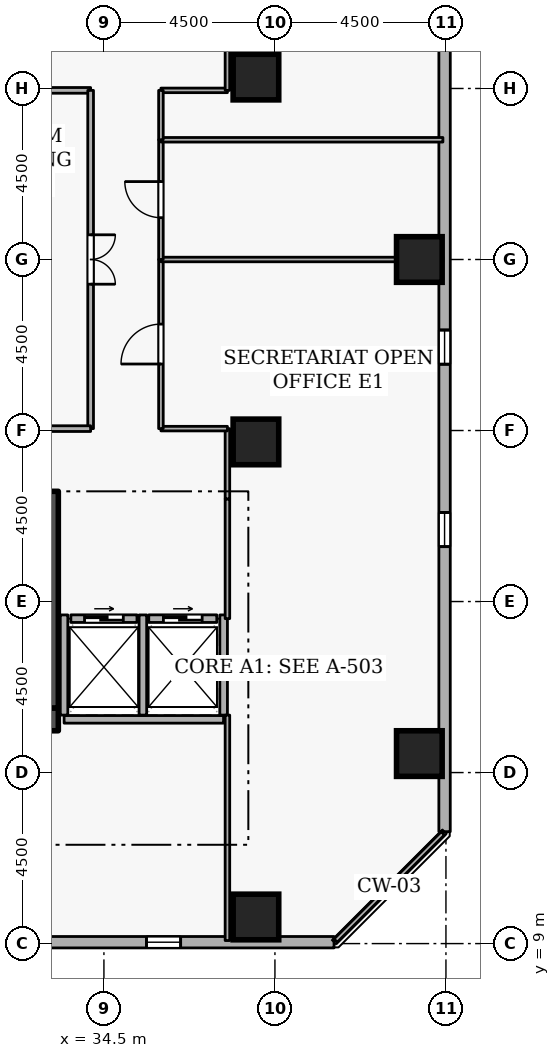
"""IFC4 building model, lengths in metres.
Left out: names, types, materials, properties, quantities, classifications, styles, units other than length and angle.
Written with IfcOpenShell. Run it as: python <this file> out.ifc"""

import sys

from ifc_helpers import new_model, si_unit, direction, frame, frame_2d, origin, origin_2d, place, context, subcontext, project, spatial, rectangle, extrude, element, fill, save


model = new_model("IFC4")
c1 = context("Model", 3, precision=1e-05, world=origin(), true_north=direction((0.0, 1.0)))
c2 = subcontext(c1, "Body", "Model", "MODEL_VIEW")
j1 = project(units=[si_unit("LENGTHUNIT", "METRE"), si_unit("PLANEANGLEUNIT", "RADIAN")], contexts=[c1])
p1 = place(None, origin())
s1 = spatial("IfcSite", under=j1, at=p1, CompositionType="ELEMENT")
p2 = place(p1, origin())
s2 = spatial("IfcBuilding", under=s1, at=p2, CompositionType="ELEMENT")
p3 = place(p2, frame((0.0, 0.0, 112.5)))
s3 = spatial("IfcBuildingStorey", under=s2, at=p3, CompositionType="ELEMENT", Elevation=112.5)
p4 = place(p3, frame((17.7, 14.9, 0.0), z_axis=(0.0, 0.0, 1.0), x_axis=(1.0, 0.0, 0.0)))
e1 = element("IfcWall", 1, at=p4, inside=s3, PredefinedType="SHEAR", context=c2, shape_type="SweptSolid", body=[
    extrude(rectangle(XDim=15.6, YDim=0.6, at=frame_2d((7.8, 0.0))), origin(), (0.0, 0.0, 1.0), 3.6),
])
p5 = place(p3, frame((33.0, 15.2, 0.0), z_axis=(0.0, 0.0, 1.0), x_axis=(0.0, 1.0, 0.0)))
e2 = element("IfcWall", 2, at=p5, inside=s3, PredefinedType="SHEAR", context=c2, shape_type="SweptSolid", body=[
    extrude(rectangle(XDim=5.7, YDim=0.6, at=frame_2d((2.85, 0.0))), origin(), (0.0, 0.0, 1.0), 3.6),
])
for number, where, z_axis, x_axis in (
    (3, (38.5, 9.7, 0.0), (0.0, 0.0, 1.0), (1.0, 0.0, 0.0)),
    (4, (42.8, 14.0, 0.0), (0.0, 0.0, 1.0), (1.0, 0.0, 0.0)),
    (5, (42.8, 27.0, 0.0), (0.0, 0.0, 1.0), (1.0, 0.0, 0.0)),
    (6, (38.5, 22.2, 0.0), (0.0, 0.0, 1.0), (1.0, 0.0, 0.0)),
    (7, (38.5, 31.8, 0.0), (0.0, 0.0, 1.0), (1.0, 0.0, 0.0)),
):
    element("IfcColumn", number, at=place(p3, frame(where, z_axis=z_axis, x_axis=x_axis)), inside=s3, PredefinedType="COLUMN", context=c2, shape_type="SweptSolid", body=[
        extrude(rectangle(XDim=1.2, YDim=1.2, at=origin_2d()), origin(), (0.0, 0.0, 1.0), 3.6),
    ])
p6 = place(p3, frame((4.119, 9.035, 0.0), z_axis=(0.0, 0.0, 1.0), x_axis=(0.999999999641, 2.6801568e-05, 0.0)))
e8 = element("IfcWall", 8, at=p6, inside=s3, PredefinedType="STANDARD", context=c2, shape_type="SweptSolid", body=[
    extrude(rectangle(XDim=36.437, YDim=0.3, at=frame_2d((18.218, 0.0))), origin(), (0.0, 0.0, 1.0), 2.7),
])
p7 = place(p6, frame((2.7, 0.0, 0.72)))
e9 = element("IfcOpeningElement", 9, at=p7, cuts=e8, PredefinedType="OPENING", context=c2, shape_type="SweptSolid", body=[
    extrude(rectangle(XDim=0.9, YDim=1.75, at=frame_2d((0.45, 0.875))), frame((0.0, 0.16, 0.0), z_axis=(0.0, -1.0, 0.0), x_axis=(1.0, 0.0, 0.0)), (0.0, 0.0, 1.0), 0.32),
])
p8 = place(p6, frame((12.3, 0.0, 0.72)))
e10 = element("IfcOpeningElement", 10, at=p8, cuts=e8, PredefinedType="OPENING", context=c2, shape_type="SweptSolid", body=[
    extrude(rectangle(XDim=0.9, YDim=1.75, at=frame_2d((0.45, 0.875))), frame((0.0, 0.16, 0.0), z_axis=(0.0, -1.0, 0.0), x_axis=(1.0, 0.0, 0.0)), (0.0, 0.0, 1.0), 0.32),
])
p9 = place(p6, frame((17.1, 0.0, 0.72)))
e11 = element("IfcOpeningElement", 11, at=p9, cuts=e8, PredefinedType="OPENING", context=c2, shape_type="SweptSolid", body=[
    extrude(rectangle(XDim=0.9, YDim=1.75, at=frame_2d((0.45, 0.875))), frame((0.0, 0.16, 0.0), z_axis=(0.0, -1.0, 0.0), x_axis=(1.0, 0.0, 0.0)), (0.0, 0.0, 1.0), 0.32),
])
p10 = place(p6, frame((26.7, 0.0, 0.72)))
e12 = element("IfcOpeningElement", 12, at=p10, cuts=e8, PredefinedType="OPENING", context=c2, shape_type="SweptSolid", body=[
    extrude(rectangle(XDim=0.9, YDim=1.75, at=frame_2d((0.45, 0.875))), frame((0.0, 0.16, 0.0), z_axis=(0.0, -1.0, 0.0), x_axis=(1.0, 0.0, 0.0)), (0.0, 0.0, 1.0), 0.32),
])
p11 = place(p6, frame((31.5, 0.0, 0.72)))
e13 = element("IfcOpeningElement", 13, at=p11, cuts=e8, PredefinedType="OPENING", context=c2, shape_type="SweptSolid", body=[
    extrude(rectangle(XDim=0.9, YDim=1.75, at=frame_2d((0.45, 0.875))), frame((0.0, 0.16, 0.0), z_axis=(0.0, -1.0, 0.0), x_axis=(1.0, 0.0, 0.0)), (0.0, 0.0, 1.0), 0.32),
])
p12 = place(p3, frame((43.464, 11.945, 0.0), z_axis=(0.0, 0.0, 1.0), x_axis=(2.6801568e-05, 0.999999999641, 0.0)))
e14 = element("IfcWall", 14, at=p12, inside=s3, PredefinedType="STANDARD", context=c2, shape_type="SweptSolid", body=[
    extrude(rectangle(XDim=36.437, YDim=0.3, at=frame_2d((18.218, 0.0))), origin(), (0.0, 0.0, 1.0), 2.7),
])
p13 = place(p12, frame((7.5, 0.0, 0.72)))
e15 = element("IfcOpeningElement", 15, at=p13, cuts=e14, PredefinedType="OPENING", context=c2, shape_type="SweptSolid", body=[
    extrude(rectangle(XDim=0.9, YDim=1.75, at=frame_2d((0.45, 0.875))), frame((0.0, 0.16, 0.0), z_axis=(0.0, -1.0, 0.0), x_axis=(1.0, 0.0, 0.0)), (0.0, 0.0, 1.0), 0.32),
])
p14 = place(p12, frame((12.3, 0.0, 0.72)))
e16 = element("IfcOpeningElement", 16, at=p14, cuts=e14, PredefinedType="OPENING", context=c2, shape_type="SweptSolid", body=[
    extrude(rectangle(XDim=0.9, YDim=1.75, at=frame_2d((0.45, 0.875))), frame((0.0, 0.16, 0.0), z_axis=(0.0, -1.0, 0.0), x_axis=(1.0, 0.0, 0.0)), (0.0, 0.0, 1.0), 0.32),
])
p15 = place(p12, frame((21.9, 0.0, 0.72)))
e17 = element("IfcOpeningElement", 17, at=p15, cuts=e14, PredefinedType="OPENING", context=c2, shape_type="SweptSolid", body=[
    extrude(rectangle(XDim=0.9, YDim=1.75, at=frame_2d((0.45, 0.875))), frame((0.0, 0.16, 0.0), z_axis=(0.0, -1.0, 0.0), x_axis=(1.0, 0.0, 0.0)), (0.0, 0.0, 1.0), 0.32),
])
p16 = place(p12, frame((31.5, 0.0, 0.72)))
e18 = element("IfcOpeningElement", 18, at=p16, cuts=e14, PredefinedType="OPENING", context=c2, shape_type="SweptSolid", body=[
    extrude(rectangle(XDim=0.9, YDim=1.75, at=frame_2d((0.45, 0.875))), frame((0.0, 0.16, 0.0), z_axis=(0.0, -1.0, 0.0), x_axis=(1.0, 0.0, 0.0)), (0.0, 0.0, 1.0), 0.32),
])
p17 = place(p3, frame((33.63, 17.55, 0.0), z_axis=(0.0, 0.0, 1.0), x_axis=(1.0, 0.0, 0.0)))
e19 = element("IfcWall", 19, at=p17, inside=s3, PredefinedType="STANDARD", context=c2, shape_type="SweptSolid", body=[
    extrude(rectangle(XDim=1.74, YDim=0.2, at=frame_2d((0.87, 0.0))), origin(), (0.0, 0.0, 1.0), 3.34),
])
p18 = place(p17, frame((0.36, 0.0, 0.0)))
e20 = element("IfcOpeningElement", 20, at=p18, cuts=e19, PredefinedType="OPENING", context=c2, shape_type="SweptSolid", body=[
    extrude(rectangle(XDim=1.02, YDim=2.06, at=frame_2d((0.51, 1.03))), frame((0.0, 0.11, 0.0), z_axis=(0.0, -1.0, 0.0), x_axis=(1.0, 0.0, 0.0)), (0.0, 0.0, 1.0), 0.22),
])
p19 = place(p3, frame((35.68, 17.55, 0.0), z_axis=(0.0, 0.0, 1.0), x_axis=(1.0, 0.0, 0.0)))
e21 = element("IfcWall", 21, at=p19, inside=s3, PredefinedType="STANDARD", context=c2, shape_type="SweptSolid", body=[
    extrude(rectangle(XDim=1.79, YDim=0.2, at=frame_2d((0.895, 0.0))), origin(), (0.0, 0.0, 1.0), 3.34),
])
p20 = place(p19, frame((0.385, 0.0, 0.0)))
e22 = element("IfcOpeningElement", 22, at=p20, cuts=e21, PredefinedType="OPENING", context=c2, shape_type="SweptSolid", body=[
    extrude(rectangle(XDim=1.02, YDim=2.06, at=frame_2d((0.51, 1.03))), frame((0.0, 0.11, 0.0), z_axis=(0.0, -1.0, 0.0), x_axis=(1.0, 0.0, 0.0)), (0.0, 0.0, 1.0), 0.22),
])
p21 = place(p3, frame((33.452, 14.9, 0.0), z_axis=(0.0, 0.0, 1.0), x_axis=(1.0, 0.0, 0.0)))
e23 = element("IfcWall", 23, at=p21, inside=s3, PredefinedType="STANDARD", context=c2, shape_type="SweptSolid", body=[
    extrude(rectangle(XDim=4.196, YDim=0.2, at=frame_2d((2.098, 0.0))), origin(), (0.0, 0.0, 1.0), 3.34),
])
for number, where, z_axis, x_axis in (
    (24, (35.525, 15.012, 0.0), (0.0, 0.0, 1.0), (0.0, 1.0, 0.0)),
    (25, (33.45, 15.012, 0.0), (0.0, 0.0, 1.0), (0.0, 1.0, 0.0)),
    (26, (37.65, 15.012, 0.0), (0.0, 0.0, 1.0), (0.0, 1.0, 0.0)),
):
    element("IfcWall", number, at=place(p3, frame(where, z_axis=z_axis, x_axis=x_axis)), inside=s3, PredefinedType="STANDARD", context=c2, shape_type="SweptSolid", body=[
        extrude(rectangle(XDim=2.636, YDim=0.2, at=frame_2d((1.318, 0.0))), origin(), (0.0, 0.0, 1.0), 3.34),
    ])
p22 = place(p3, frame((37.75, 17.55, 0.0), z_axis=(0.0, 0.0, 1.0), x_axis=(0.0, 1.0, 0.0)))
e27 = element("IfcWall", 27, at=p22, inside=s3, PredefinedType="PARTITIONING", context=c2, shape_type="SweptSolid", body=[
    extrude(rectangle(XDim=3.15, YDim=0.12, at=frame_2d((1.575, 0.0))), origin(), (0.0, 0.0, 1.0), 3.34),
])
p23 = place(p3, frame((37.75, 20.7, 0.0), z_axis=(0.0, 0.0, 1.0), x_axis=(0.0, 1.0, 0.0)))
e28 = element("IfcWall", 28, at=p23, inside=s3, PredefinedType="PARTITIONING", context=c2, shape_type="SweptSolid", body=[
    extrude(rectangle(XDim=1.85, YDim=0.12, at=frame_2d((0.925, 0.0))), origin(), (0.0, 0.0, 1.0), 3.34),
])
p24 = place(p3, frame((37.75, 22.55, 0.0), z_axis=(0.0, 0.0, 1.0), x_axis=(-1.0, 0.0, 0.0)))
e29 = element("IfcWall", 29, at=p24, inside=s3, PredefinedType="PARTITIONING", context=c2, shape_type="SweptSolid", body=[
    extrude(rectangle(XDim=1.75, YDim=0.12, at=frame_2d((0.875, 0.0))), origin(), (0.0, 0.0, 1.0), 3.34),
])
p25 = place(p3, frame((36.0, 22.55, 0.0), z_axis=(0.0, 0.0, 1.0), x_axis=(0.0, 1.0, 0.0)))
e30 = element("IfcWall", 30, at=p25, inside=s3, PredefinedType="PARTITIONING", context=c2, shape_type="SweptSolid", body=[
    extrude(rectangle(XDim=4.45, YDim=0.12, at=frame_2d((2.225, 0.0))), origin(), (0.0, 0.0, 1.0), 3.34),
])
p26 = place(p25, frame((1.7, 0.0, 0.0)))
e31 = element("IfcOpeningElement", 31, at=p26, cuts=e30, PredefinedType="OPENING", context=c2, shape_type="SweptSolid", body=[
    extrude(rectangle(XDim=1.05, YDim=2.1, at=frame_2d((0.525, 1.05))), frame((0.0, 0.07, 0.0), z_axis=(0.0, -1.0, 0.0), x_axis=(1.0, 0.0, 0.0)), (0.0, 0.0, 1.0), 0.14),
])
p27 = place(p3, frame((36.0, 27.0, 0.0), z_axis=(0.0, 0.0, 1.0), x_axis=(1.0, 0.0, 0.0)))
e32 = element("IfcWall", 32, at=p27, inside=s3, PredefinedType="PARTITIONING", context=c2, shape_type="SweptSolid", body=[
    extrude(rectangle(XDim=7.42, YDim=0.12, at=frame_2d((3.71, 0.0))), origin(), (0.0, 0.0, 1.0), 2.882),
])
p28 = place(p3, frame((43.42, 11.902, 0.0), z_axis=(0.0, 0.0, 1.0), x_axis=(-0.707106781187, -0.707106781187, 0.0)))
e33 = element("IfcWall", 33, at=p28, inside=s3, PredefinedType="PARTITIONING", context=c2, shape_type="SweptSolid", body=[
    extrude(rectangle(XDim=3.99, YDim=0.12, at=frame_2d((1.995, 0.0))), origin(), (0.0, 0.0, 1.0), 3.34),
])
p29 = place(p3, frame((37.75, 9.08, 0.0), z_axis=(0.0, 0.0, 1.0), x_axis=(0.0, 1.0, 0.0)))
e34 = element("IfcWall", 34, at=p29, inside=s3, PredefinedType="PARTITIONING", context=c2, shape_type="SweptSolid", body=[
    extrude(rectangle(XDim=5.932, YDim=0.12, at=frame_2d((2.966, 0.0))), origin(), (0.0, 0.0, 1.0), 3.34),
])
p30 = place(p3, frame((36.0, 27.0, 0.0), z_axis=(0.0, 0.0, 1.0), x_axis=(0.0, 1.0, 0.0)))
e35 = element("IfcWall", 35, at=p30, inside=s3, PredefinedType="PARTITIONING", context=c2, shape_type="SweptSolid", body=[
    extrude(rectangle(XDim=3.15, YDim=0.12, at=frame_2d((1.575, 0.0))), origin(), (0.0, 0.0, 1.0), 3.34),
])
p31 = place(p30, frame((1.1, 0.0, 0.0)))
e36 = element("IfcOpeningElement", 36, at=p31, cuts=e35, PredefinedType="OPENING", context=c2, shape_type="SweptSolid", body=[
    extrude(rectangle(XDim=0.95, YDim=2.1, at=frame_2d((0.475, 1.05))), frame((0.0, 0.07, 0.0), z_axis=(0.0, -1.0, 0.0), x_axis=(1.0, 0.0, 0.0)), (0.0, 0.0, 1.0), 0.14),
])
p32 = place(p3, frame((36.0, 30.15, 0.0), z_axis=(0.0, 0.0, 1.0), x_axis=(1.0, 0.0, 0.0)))
e37 = element("IfcWall", 37, at=p32, inside=s3, PredefinedType="PARTITIONING", context=c2, shape_type="SweptSolid", body=[
    extrude(rectangle(XDim=7.42, YDim=0.12, at=frame_2d((3.71, 0.0))), origin(), (0.0, 0.0, 1.0), 3.34),
])
p33 = place(p3, frame((36.0, 31.45, 0.0), z_axis=(0.0, 0.0, 1.0), x_axis=(1.0, 0.0, 0.0)))
e38 = element("IfcWall", 38, at=p33, inside=s3, PredefinedType="PARTITIONING", context=c2, shape_type="SweptSolid", body=[
    extrude(rectangle(XDim=1.75, YDim=0.12, at=frame_2d((0.875, 0.0))), origin(), (0.0, 0.0, 1.0), 3.34),
])
p34 = place(p3, frame((37.75, 31.45, 0.0), z_axis=(0.0, 0.0, 1.0), x_axis=(0.0, 1.0, 0.0)))
e39 = element("IfcWall", 39, at=p34, inside=s3, PredefinedType="PARTITIONING", context=c2, shape_type="SweptSolid", body=[
    extrude(rectangle(XDim=1.85, YDim=0.12, at=frame_2d((0.925, 0.0))), origin(), (0.0, 0.0, 1.0), 3.34),
])
p35 = place(p3, frame((36.0, 30.15, 0.0), z_axis=(0.0, 0.0, 1.0), x_axis=(0.0, 1.0, 0.0)))
e40 = element("IfcWall", 40, at=p35, inside=s3, PredefinedType="PARTITIONING", context=c2, shape_type="SweptSolid", body=[
    extrude(rectangle(XDim=1.3, YDim=0.12, at=frame_2d((0.65, 0.0))), origin(), (0.0, 0.0, 1.0), 3.34),
])
p36 = place(p3, frame((30.7, 31.45, 0.0), z_axis=(0.0, 0.0, 1.0), x_axis=(1.0, 0.0, 0.0)))
e41 = element("IfcWall", 41, at=p36, inside=s3, PredefinedType="PARTITIONING", context=c2, shape_type="SweptSolid", body=[
    extrude(rectangle(XDim=3.45, YDim=0.15, at=frame_2d((1.725, 0.0))), origin(), (0.0, 0.0, 1.0), 3.34),
])
p37 = place(p3, frame((34.15, 31.45, 0.0), z_axis=(0.0, 0.0, 1.0), x_axis=(0.0, -1.0, 0.0)))
e42 = element("IfcWall", 42, at=p37, inside=s3, PredefinedType="PARTITIONING", context=c2, shape_type="SweptSolid", body=[
    extrude(rectangle(XDim=8.9, YDim=0.15, at=frame_2d((4.45, 0.0))), origin(), (0.0, 0.0, 1.0), 3.34),
])
p38 = place(p37, frame((3.8, 0.0, 0.0)))
e43 = element("IfcOpeningElement", 43, at=p38, cuts=e42, PredefinedType="OPENING", context=c2, shape_type="SweptSolid", body=[
    extrude(rectangle(XDim=1.3, YDim=2.12, at=frame_2d((0.65, 1.06))), frame((0.0, 0.085, 0.0), z_axis=(0.0, -1.0, 0.0), x_axis=(1.0, 0.0, 0.0)), (0.0, 0.0, 1.0), 0.17),
])
p39 = place(p3, frame((34.15, 22.55, 0.0), z_axis=(0.0, 0.0, 1.0), x_axis=(-1.0, 0.0, 0.0)))
e44 = element("IfcWall", 44, at=p39, inside=s3, PredefinedType="PARTITIONING", context=c2, shape_type="SweptSolid", body=[
    extrude(rectangle(XDim=3.45, YDim=0.15, at=frame_2d((1.725, 0.0))), origin(), (0.0, 0.0, 1.0), 3.34),
])
p40 = place(p11, origin())
e45 = element("IfcWindow", 45, at=p40, inside=s3, PartitioningType="SINGLE_PANEL", PredefinedType="WINDOW", context=c2, shape_type="SweptSolid", body=[
    extrude(rectangle(XDim=0.9, YDim=1.75, at=frame_2d((0.45, 0.875))), frame((0.0, 0.03, 0.0), z_axis=(0.0, -1.0, 0.0), x_axis=(1.0, 0.0, 0.0)), (0.0, 0.0, 1.0), 0.06),
])
fill(e13, e45)
p41 = place(p13, origin())
e46 = element("IfcWindow", 46, at=p41, inside=s3, PartitioningType="SINGLE_PANEL", PredefinedType="WINDOW", context=c2, shape_type="SweptSolid", body=[
    extrude(rectangle(XDim=0.9, YDim=1.75, at=frame_2d((0.45, 0.875))), frame((0.0, 0.03, 0.0), z_axis=(0.0, -1.0, 0.0), x_axis=(1.0, 0.0, 0.0)), (0.0, 0.0, 1.0), 0.06),
])
fill(e15, e46)
p42 = place(p14, origin())
e47 = element("IfcWindow", 47, at=p42, inside=s3, PartitioningType="SINGLE_PANEL", PredefinedType="WINDOW", context=c2, shape_type="SweptSolid", body=[
    extrude(rectangle(XDim=0.9, YDim=1.75, at=frame_2d((0.45, 0.875))), frame((0.0, 0.03, 0.0), z_axis=(0.0, -1.0, 0.0), x_axis=(1.0, 0.0, 0.0)), (0.0, 0.0, 1.0), 0.06),
])
fill(e16, e47)
p43 = place(p18, origin())
e48 = element("IfcDoor", 48, at=p43, inside=s3, OperationType="SLIDING_TO_LEFT", PredefinedType="DOOR", context=c2, shape_type="SweptSolid", body=[
    extrude(rectangle(XDim=1.02, YDim=2.06, at=frame_2d((0.51, 1.03))), frame((0.0, 0.025, 0.0), z_axis=(0.0, -1.0, 0.0), x_axis=(1.0, 0.0, 0.0)), (0.0, 0.0, 1.0), 0.05),
])
fill(e20, e48)
p44 = place(p20, origin())
e49 = element("IfcDoor", 49, at=p44, inside=s3, OperationType="SLIDING_TO_LEFT", PredefinedType="DOOR", context=c2, shape_type="SweptSolid", body=[
    extrude(rectangle(XDim=1.02, YDim=2.06, at=frame_2d((0.51, 1.03))), frame((0.0, 0.025, 0.0), z_axis=(0.0, -1.0, 0.0), x_axis=(1.0, 0.0, 0.0)), (0.0, 0.0, 1.0), 0.05),
])
fill(e22, e49)
p45 = place(p26, origin())
e50 = element("IfcDoor", 50, at=p45, inside=s3, OperationType="SINGLE_SWING_LEFT", PredefinedType="DOOR", context=c2, shape_type="SweptSolid", body=[
    extrude(rectangle(XDim=1.05, YDim=2.1, at=frame_2d((0.525, 1.05))), frame((0.0, 0.025, 0.0), z_axis=(0.0, -1.0, 0.0), x_axis=(1.0, 0.0, 0.0)), (0.0, 0.0, 1.0), 0.05),
])
fill(e31, e50)
p46 = place(p31, origin())
e51 = element("IfcDoor", 51, at=p46, inside=s3, OperationType="SINGLE_SWING_RIGHT", PredefinedType="DOOR", context=c2, shape_type="SweptSolid", body=[
    extrude(rectangle(XDim=0.95, YDim=2.1, at=frame_2d((0.475, 1.05))), frame((0.0, 0.025, 0.0), z_axis=(0.0, -1.0, 0.0), x_axis=(1.0, 0.0, 0.0)), (0.0, 0.0, 1.0), 0.05),
])
fill(e36, e51)
p47 = place(p38, origin())
e52 = element("IfcDoor", 52, at=p47, inside=s3, OperationType="DOUBLE_DOOR_SINGLE_SWING", PredefinedType="DOOR", context=c2, shape_type="SweptSolid", body=[
    extrude(rectangle(XDim=1.3, YDim=2.12, at=frame_2d((0.65, 1.06))), frame((0.0, 0.025, 0.0), z_axis=(0.0, -1.0, 0.0), x_axis=(1.0, 0.0, 0.0)), (0.0, 0.0, 1.0), 0.05),
])
fill(e43, e52)
save(model, sys.argv[1])
